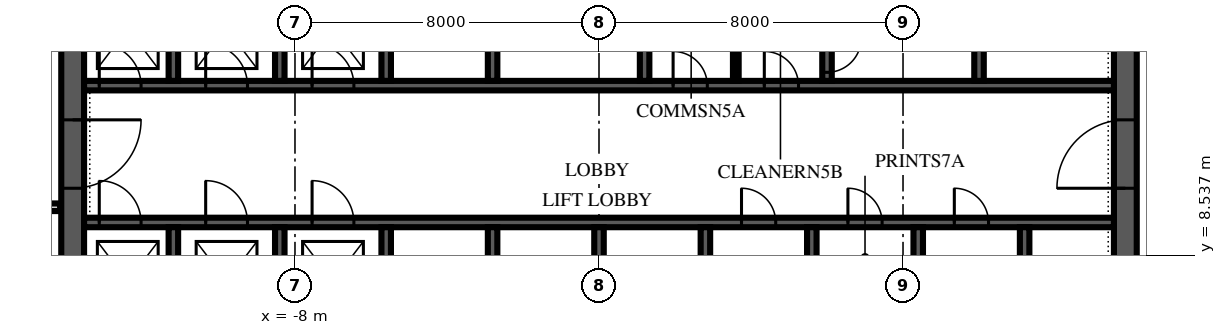
"""IFC4 building model, lengths in metres.
Left out: names, types, materials, properties, quantities, classifications, styles, units other than length and angle.
Written with IfcOpenShell. Run it as: python <this file> out.ifc"""

import sys

from ifc_helpers import new_model, si_unit, direction, frame, frame_2d, origin, place, context, subcontext, project, spatial, polyline, rectangle, outline, extrude, element, fill, save


model = new_model("IFC4")
c1 = context("Model", 3, precision=1e-05, world=origin(), true_north=direction((0.0, 1.0)))
c2 = subcontext(c1, "Body", "Model", "MODEL_VIEW")
j1 = project(units=[si_unit("LENGTHUNIT", "METRE"), si_unit("PLANEANGLEUNIT", "RADIAN")], contexts=[c1])
p1 = place(None, origin())
s1 = spatial("IfcSite", under=j1, at=p1, CompositionType="ELEMENT")
p2 = place(p1, origin())
s2 = spatial("IfcBuilding", under=s1, at=p2, CompositionType="ELEMENT")
p3 = place(p2, frame((0.0, 0.0, 182.0)))
s3 = spatial("IfcBuildingStorey", under=s2, at=p3, CompositionType="ELEMENT", Elevation=182.0)
p4 = place(p3, frame((13.85, 6.15, 0.0), z_axis=(0.0, 0.0, 1.0), x_axis=(0.0, 1.0, 0.0)))
e1 = element("IfcWall", 1, at=p4, inside=s3, PredefinedType="SHEAR", context=c2, shape_type="SweptSolid", body=[
    extrude(outline(polyline([(0.0, -0.3), (17.7, -0.3), (17.7, 0.0), (17.4, 0.0), (17.4, 0.3), (0.3, 0.3), (0.3, 0.0), (0.0, 0.0), (0.0, -0.3)])), origin(), (0.0, 0.0, 1.0), 4.0),
])
p5 = place(p4, frame((4.15, 0.0, 0.0)))
e2 = element("IfcOpeningElement", 2, at=p5, cuts=e1, PredefinedType="OPENING", context=c2, shape_type="SweptSolid", body=[
    extrude(rectangle(XDim=1.8, YDim=2.4, at=frame_2d((0.9, 1.2))), frame((0.0, 0.315, 0.0), z_axis=(0.0, -1.0, 0.0), x_axis=(1.0, 0.0, 0.0)), (0.0, 0.0, 1.0), 0.63),
])
p6 = place(p3, frame((-13.85, 23.85, 0.0), z_axis=(0.0, 0.0, 1.0), x_axis=(0.0, -1.0, 0.0)))
e3 = element("IfcWall", 3, at=p6, inside=s3, PredefinedType="SHEAR", context=c2, shape_type="SweptSolid", body=[
    extrude(outline(polyline([(0.0, -0.3), (17.7, -0.3), (17.7, 0.0), (17.4, 0.0), (17.4, 0.3), (0.3, 0.3), (0.3, 0.0), (0.0, 0.0), (0.0, -0.3)])), origin(), (0.0, 0.0, 1.0), 4.0),
])
p7 = place(p6, frame((11.75, 0.0, 0.0)))
e4 = element("IfcOpeningElement", 4, at=p7, cuts=e3, PredefinedType="OPENING", context=c2, shape_type="SweptSolid", body=[
    extrude(rectangle(XDim=1.8, YDim=2.4, at=frame_2d((0.9, 1.2))), frame((0.0, 0.315, 0.0), z_axis=(0.0, -1.0, 0.0), x_axis=(1.0, 0.0, 0.0)), (0.0, 0.0, 1.0), 0.63),
])
p8 = place(p3, frame((-13.55, 9.4, 0.0), z_axis=(0.0, 0.0, 1.0), x_axis=(1.0, 0.0, 0.0)))
e5 = element("IfcWall", 5, at=p8, inside=s3, PredefinedType="SHEAR", context=c2, shape_type="SweptSolid", body=[
    extrude(rectangle(XDim=27.1, YDim=0.25, at=frame_2d((13.55, 0.0))), origin(), (0.0, 0.0, 1.0), 4.0),
])
p9 = place(p8, frame((0.4, 0.0, 0.0)))
e6 = element("IfcOpeningElement", 6, at=p9, cuts=e5, PredefinedType="OPENING", context=c2, shape_type="SweptSolid", body=[
    extrude(rectangle(XDim=1.1, YDim=2.1, at=frame_2d((0.55, 1.05))), frame((0.0, 0.14, 0.0), z_axis=(0.0, -1.0, 0.0), x_axis=(1.0, 0.0, 0.0)), (0.0, 0.0, 1.0), 0.28),
])
p10 = place(p8, frame((3.2, 0.0, 0.0)))
e7 = element("IfcOpeningElement", 7, at=p10, cuts=e5, PredefinedType="OPENING", context=c2, shape_type="SweptSolid", body=[
    extrude(rectangle(XDim=1.1, YDim=2.1, at=frame_2d((0.55, 1.05))), frame((0.0, 0.14, 0.0), z_axis=(0.0, -1.0, 0.0), x_axis=(1.0, 0.0, 0.0)), (0.0, 0.0, 1.0), 0.28),
])
p11 = place(p8, frame((6.0, 0.0, 0.0)))
e8 = element("IfcOpeningElement", 8, at=p11, cuts=e5, PredefinedType="OPENING", context=c2, shape_type="SweptSolid", body=[
    extrude(rectangle(XDim=1.1, YDim=2.1, at=frame_2d((0.55, 1.05))), frame((0.0, 0.14, 0.0), z_axis=(0.0, -1.0, 0.0), x_axis=(1.0, 0.0, 0.0)), (0.0, 0.0, 1.0), 0.28),
])
p12 = place(p8, frame((17.3, 0.0, 0.0)))
e9 = element("IfcOpeningElement", 9, at=p12, cuts=e5, PredefinedType="OPENING", context=c2, shape_type="SweptSolid", body=[
    extrude(rectangle(XDim=0.9, YDim=2.1, at=frame_2d((0.45, 1.05))), frame((0.0, 0.14, 0.0), z_axis=(0.0, -1.0, 0.0), x_axis=(1.0, 0.0, 0.0)), (0.0, 0.0, 1.0), 0.28),
])
p13 = place(p8, frame((20.1, 0.0, 0.0)))
e10 = element("IfcOpeningElement", 10, at=p13, cuts=e5, PredefinedType="OPENING", context=c2, shape_type="SweptSolid", body=[
    extrude(rectangle(XDim=0.9, YDim=2.1, at=frame_2d((0.45, 1.05))), frame((0.0, 0.14, 0.0), z_axis=(0.0, -1.0, 0.0), x_axis=(1.0, 0.0, 0.0)), (0.0, 0.0, 1.0), 0.28),
])
p14 = place(p8, frame((22.9, 0.0, 0.0)))
e11 = element("IfcOpeningElement", 11, at=p14, cuts=e5, PredefinedType="OPENING", context=c2, shape_type="SweptSolid", body=[
    extrude(rectangle(XDim=0.9, YDim=2.1, at=frame_2d((0.45, 1.05))), frame((0.0, 0.14, 0.0), z_axis=(0.0, -1.0, 0.0), x_axis=(1.0, 0.0, 0.0)), (0.0, 0.0, 1.0), 0.28),
])
p15 = place(p3, frame((-13.55, 13.0, 0.0), z_axis=(0.0, 0.0, 1.0), x_axis=(1.0, 0.0, 0.0)))
e12 = element("IfcWall", 12, at=p15, inside=s3, PredefinedType="SHEAR", context=c2, shape_type="SweptSolid", body=[
    extrude(rectangle(XDim=27.1, YDim=0.25, at=frame_2d((13.55, 0.0))), origin(), (0.0, 0.0, 1.0), 4.0),
])
p16 = place(p15, frame((0.4, 0.0, 0.0)))
e13 = element("IfcOpeningElement", 13, at=p16, cuts=e12, PredefinedType="OPENING", context=c2, shape_type="SweptSolid", body=[
    extrude(rectangle(XDim=1.1, YDim=2.1, at=frame_2d((0.55, 1.05))), frame((0.0, 0.14, 0.0), z_axis=(0.0, -1.0, 0.0), x_axis=(1.0, 0.0, 0.0)), (0.0, 0.0, 1.0), 0.28),
])
p17 = place(p15, frame((3.2, 0.0, 0.0)))
e14 = element("IfcOpeningElement", 14, at=p17, cuts=e12, PredefinedType="OPENING", context=c2, shape_type="SweptSolid", body=[
    extrude(rectangle(XDim=1.1, YDim=2.1, at=frame_2d((0.55, 1.05))), frame((0.0, 0.14, 0.0), z_axis=(0.0, -1.0, 0.0), x_axis=(1.0, 0.0, 0.0)), (0.0, 0.0, 1.0), 0.28),
])
p18 = place(p15, frame((6.0, 0.0, 0.0)))
e15 = element("IfcOpeningElement", 15, at=p18, cuts=e12, PredefinedType="OPENING", context=c2, shape_type="SweptSolid", body=[
    extrude(rectangle(XDim=1.1, YDim=2.1, at=frame_2d((0.55, 1.05))), frame((0.0, 0.14, 0.0), z_axis=(0.0, -1.0, 0.0), x_axis=(1.0, 0.0, 0.0)), (0.0, 0.0, 1.0), 0.28),
])
p19 = place(p15, frame((15.5, 0.0, 0.0)))
e16 = element("IfcOpeningElement", 16, at=p19, cuts=e12, PredefinedType="OPENING", context=c2, shape_type="SweptSolid", body=[
    extrude(rectangle(XDim=0.9, YDim=2.1, at=frame_2d((0.45, 1.05))), frame((0.0, 0.14, 0.0), z_axis=(0.0, -1.0, 0.0), x_axis=(1.0, 0.0, 0.0)), (0.0, 0.0, 1.0), 0.28),
])
p20 = place(p15, frame((17.9, 0.0, 0.0)))
e17 = element("IfcOpeningElement", 17, at=p20, cuts=e12, PredefinedType="OPENING", context=c2, shape_type="SweptSolid", body=[
    extrude(rectangle(XDim=0.9, YDim=2.1, at=frame_2d((0.45, 1.05))), frame((0.0, 0.14, 0.0), z_axis=(0.0, -1.0, 0.0), x_axis=(1.0, 0.0, 0.0)), (0.0, 0.0, 1.0), 0.28),
])
for number, where, z_axis, x_axis in (
    (18, (-11.2, 6.45, 0.0), (0.0, 0.0, 1.0), (0.0, 1.0, 0.0)),
    (19, (-8.4, 6.45, 0.0), (0.0, 0.0, 1.0), (0.0, 1.0, 0.0)),
    (20, (-5.6, 6.45, 0.0), (0.0, 0.0, 1.0), (0.0, 1.0, 0.0)),
    (21, (-2.8, 6.45, 0.0), (0.0, 0.0, 1.0), (0.0, 1.0, 0.0)),
    (22, (0.0, 6.45, 0.0), (0.0, 0.0, 1.0), (0.0, 1.0, 0.0)),
    (23, (2.8, 6.45, 0.0), (0.0, 0.0, 1.0), (0.0, 1.0, 0.0)),
    (24, (5.6, 6.45, 0.0), (0.0, 0.0, 1.0), (0.0, 1.0, 0.0)),
    (25, (8.4, 6.45, 0.0), (0.0, 0.0, 1.0), (0.0, 1.0, 0.0)),
    (26, (11.2, 6.45, 0.0), (0.0, 0.0, 1.0), (0.0, 1.0, 0.0)),
):
    element("IfcWall", number, at=place(p3, frame(where, z_axis=z_axis, x_axis=x_axis)), inside=s3, PredefinedType="SHEAR", context=c2, shape_type="SweptSolid", body=[
        extrude(rectangle(XDim=2.825, YDim=0.25, at=frame_2d((1.413, 0.0))), origin(), (0.0, 0.0, 1.0), 4.0),
    ])
for number, where, z_axis, x_axis in (
    (27, (-11.2, 13.125, 0.0), (0.0, 0.0, 1.0), (0.0, 1.0, 0.0)),
    (28, (-8.4, 13.125, 0.0), (0.0, 0.0, 1.0), (0.0, 1.0, 0.0)),
    (29, (-5.6, 13.125, 0.0), (0.0, 0.0, 1.0), (0.0, 1.0, 0.0)),
    (30, (-2.8, 13.125, 0.0), (0.0, 0.0, 1.0), (0.0, 1.0, 0.0)),
    (31, (1.2, 13.125, 0.0), (0.0, 0.0, 1.0), (0.0, 1.0, 0.0)),
):
    element("IfcWall", number, at=place(p3, frame(where, z_axis=z_axis, x_axis=x_axis)), inside=s3, PredefinedType="SHEAR", context=c2, shape_type="SweptSolid", body=[
        extrude(rectangle(XDim=2.75, YDim=0.25, at=frame_2d((1.375, 0.0))), origin(), (0.0, 0.0, 1.0), 4.0),
    ])
p21 = place(p3, frame((6.0, 13.125, 0.0), z_axis=(0.0, 0.0, 1.0), x_axis=(0.0, 1.0, 0.0)))
e32 = element("IfcWall", 32, at=p21, inside=s3, PredefinedType="SHEAR", context=c2, shape_type="SweptSolid", body=[
    extrude(rectangle(XDim=2.75, YDim=0.25, at=frame_2d((1.375, 0.0))), origin(), (0.0, 0.0, 1.0), 4.0),
])
p22 = place(p21, frame((0.225, 0.0, 0.0)))
e33 = element("IfcOpeningElement", 33, at=p22, cuts=e32, PredefinedType="OPENING", context=c2, shape_type="SweptSolid", body=[
    extrude(rectangle(XDim=0.9, YDim=2.1, at=frame_2d((0.45, 1.05))), frame((0.0, 0.14, 0.0), z_axis=(0.0, -1.0, 0.0), x_axis=(1.0, 0.0, 0.0)), (0.0, 0.0, 1.0), 0.28),
])
p23 = place(p3, frame((10.0, 13.125, 0.0), z_axis=(0.0, 0.0, 1.0), x_axis=(0.0, 1.0, 0.0)))
e34 = element("IfcWall", 34, at=p23, inside=s3, PredefinedType="SHEAR", context=c2, shape_type="SweptSolid", body=[
    extrude(rectangle(XDim=2.75, YDim=0.25, at=frame_2d((1.375, 0.0))), origin(), (0.0, 0.0, 1.0), 4.0),
])
p24 = place(p3, frame((3.6, 13.125, 0.0), z_axis=(0.0, 0.0, 1.0), x_axis=(0.0, 1.0, 0.0)))
e35 = element("IfcWall", 35, at=p24, inside=s3, PredefinedType="PARTITIONING", context=c2, shape_type="SweptSolid", body=[
    extrude(rectangle(XDim=2.75, YDim=0.15, at=frame_2d((1.375, 0.0))), origin(), (0.0, 0.0, 1.0), 3.85),
])
p25 = place(p3, frame((-16.2, 9.8, 0.0), z_axis=(0.0, 0.0, 1.0), x_axis=(1.0, 0.0, 0.0)))
e36 = element("IfcWall", 36, at=p25, inside=s3, PredefinedType="PARTITIONING", context=c2, shape_type="SweptSolid", body=[
    extrude(rectangle(XDim=2.02, YDim=0.2, at=frame_2d((1.01, 0.0))), origin(), (0.0, 0.0, 1.0), 3.85),
])
p26 = place(p5, origin())
e37 = element("IfcDoor", 37, at=p26, inside=s3, OperationType="DOUBLE_DOOR_SINGLE_SWING", PredefinedType="DOOR", context=c2, shape_type="SweptSolid", body=[
    extrude(rectangle(XDim=1.8, YDim=2.4, at=frame_2d((0.9, 1.2))), frame((0.0, 0.3, 0.0), z_axis=(0.0, -1.0, 0.0), x_axis=(1.0, 0.0, 0.0)), (0.0, 0.0, 1.0), 0.6),
])
fill(e2, e37)
p27 = place(p7, origin())
e38 = element("IfcDoor", 38, at=p27, inside=s3, OperationType="DOUBLE_DOOR_SINGLE_SWING", PredefinedType="DOOR", context=c2, shape_type="SweptSolid", body=[
    extrude(rectangle(XDim=1.8, YDim=2.4, at=frame_2d((0.9, 1.2))), frame((0.0, 0.3, 0.0), z_axis=(0.0, -1.0, 0.0), x_axis=(1.0, 0.0, 0.0)), (0.0, 0.0, 1.0), 0.6),
])
fill(e4, e38)
p28 = place(p9, origin())
e39 = element("IfcDoor", 39, at=p28, inside=s3, OperationType="SLIDING_TO_LEFT", PredefinedType="DOOR", context=c2, shape_type="SweptSolid", body=[
    extrude(rectangle(XDim=1.1, YDim=2.1, at=frame_2d((0.55, 1.05))), frame((0.0, 0.125, 0.0), z_axis=(0.0, -1.0, 0.0), x_axis=(1.0, 0.0, 0.0)), (0.0, 0.0, 1.0), 0.25),
])
fill(e6, e39)
p29 = place(p10, origin())
e40 = element("IfcDoor", 40, at=p29, inside=s3, OperationType="SLIDING_TO_LEFT", PredefinedType="DOOR", context=c2, shape_type="SweptSolid", body=[
    extrude(rectangle(XDim=1.1, YDim=2.1, at=frame_2d((0.55, 1.05))), frame((0.0, 0.125, 0.0), z_axis=(0.0, -1.0, 0.0), x_axis=(1.0, 0.0, 0.0)), (0.0, 0.0, 1.0), 0.25),
])
fill(e7, e40)
p30 = place(p11, origin())
e41 = element("IfcDoor", 41, at=p30, inside=s3, OperationType="SLIDING_TO_LEFT", PredefinedType="DOOR", context=c2, shape_type="SweptSolid", body=[
    extrude(rectangle(XDim=1.1, YDim=2.1, at=frame_2d((0.55, 1.05))), frame((0.0, 0.125, 0.0), z_axis=(0.0, -1.0, 0.0), x_axis=(1.0, 0.0, 0.0)), (0.0, 0.0, 1.0), 0.25),
])
fill(e8, e41)
p31 = place(p16, origin())
e42 = element("IfcDoor", 42, at=p31, inside=s3, OperationType="SLIDING_TO_LEFT", PredefinedType="DOOR", context=c2, shape_type="SweptSolid", body=[
    extrude(rectangle(XDim=1.1, YDim=2.1, at=frame_2d((0.55, 1.05))), frame((0.0, 0.125, 0.0), z_axis=(0.0, -1.0, 0.0), x_axis=(1.0, 0.0, 0.0)), (0.0, 0.0, 1.0), 0.25),
])
fill(e13, e42)
p32 = place(p17, origin())
e43 = element("IfcDoor", 43, at=p32, inside=s3, OperationType="SLIDING_TO_LEFT", PredefinedType="DOOR", context=c2, shape_type="SweptSolid", body=[
    extrude(rectangle(XDim=1.1, YDim=2.1, at=frame_2d((0.55, 1.05))), frame((0.0, 0.125, 0.0), z_axis=(0.0, -1.0, 0.0), x_axis=(1.0, 0.0, 0.0)), (0.0, 0.0, 1.0), 0.25),
])
fill(e14, e43)
p33 = place(p18, origin())
e44 = element("IfcDoor", 44, at=p33, inside=s3, OperationType="SLIDING_TO_LEFT", PredefinedType="DOOR", context=c2, shape_type="SweptSolid", body=[
    extrude(rectangle(XDim=1.1, YDim=2.1, at=frame_2d((0.55, 1.05))), frame((0.0, 0.125, 0.0), z_axis=(0.0, -1.0, 0.0), x_axis=(1.0, 0.0, 0.0)), (0.0, 0.0, 1.0), 0.25),
])
fill(e15, e44)
p34 = place(p19, origin())
e45 = element("IfcDoor", 45, at=p34, inside=s3, OperationType="SINGLE_SWING_LEFT", PredefinedType="DOOR", context=c2, shape_type="SweptSolid", body=[
    extrude(rectangle(XDim=0.9, YDim=2.1, at=frame_2d((0.45, 1.05))), frame((0.0, 0.125, 0.0), z_axis=(0.0, -1.0, 0.0), x_axis=(1.0, 0.0, 0.0)), (0.0, 0.0, 1.0), 0.25),
])
fill(e16, e45)
p35 = place(p20, origin())
e46 = element("IfcDoor", 46, at=p35, inside=s3, OperationType="SINGLE_SWING_LEFT", PredefinedType="DOOR", context=c2, shape_type="SweptSolid", body=[
    extrude(rectangle(XDim=0.9, YDim=2.1, at=frame_2d((0.45, 1.05))), frame((0.0, 0.125, 0.0), z_axis=(0.0, -1.0, 0.0), x_axis=(1.0, 0.0, 0.0)), (0.0, 0.0, 1.0), 0.25),
])
fill(e17, e46)
p36 = place(p22, frame((0.9, 0.0, 0.0), z_axis=(0.0, 0.0, 1.0), x_axis=(-1.0, 0.0, 0.0)))
e47 = element("IfcDoor", 47, at=p36, inside=s3, OperationType="SINGLE_SWING_LEFT", PredefinedType="DOOR", context=c2, shape_type="SweptSolid", body=[
    extrude(rectangle(XDim=0.9, YDim=2.1, at=frame_2d((0.45, 1.05))), frame((0.0, 0.125, 0.0), z_axis=(0.0, -1.0, 0.0), x_axis=(1.0, 0.0, 0.0)), (0.0, 0.0, 1.0), 0.25),
])
fill(e33, e47)
p37 = place(p12, origin())
e48 = element("IfcDoor", 48, at=p37, inside=s3, OperationType="SINGLE_SWING_LEFT", PredefinedType="DOOR", context=c2, shape_type="SweptSolid", body=[
    extrude(rectangle(XDim=0.9, YDim=2.1, at=frame_2d((0.45, 1.05))), frame((0.0, 0.125, 0.0), z_axis=(0.0, -1.0, 0.0), x_axis=(1.0, 0.0, 0.0)), (0.0, 0.0, 1.0), 0.25),
])
fill(e9, e48)
p38 = place(p13, origin())
e49 = element("IfcDoor", 49, at=p38, inside=s3, OperationType="SINGLE_SWING_LEFT", PredefinedType="DOOR", context=c2, shape_type="SweptSolid", body=[
    extrude(rectangle(XDim=0.9, YDim=2.1, at=frame_2d((0.45, 1.05))), frame((0.0, 0.125, 0.0), z_axis=(0.0, -1.0, 0.0), x_axis=(1.0, 0.0, 0.0)), (0.0, 0.0, 1.0), 0.25),
])
fill(e10, e49)
p39 = place(p14, origin())
e50 = element("IfcDoor", 50, at=p39, inside=s3, OperationType="SINGLE_SWING_LEFT", PredefinedType="DOOR", context=c2, shape_type="SweptSolid", body=[
    extrude(rectangle(XDim=0.9, YDim=2.1, at=frame_2d((0.45, 1.05))), frame((0.0, 0.125, 0.0), z_axis=(0.0, -1.0, 0.0), x_axis=(1.0, 0.0, 0.0)), (0.0, 0.0, 1.0), 0.25),
])
fill(e11, e50)
save(model, sys.argv[1])
